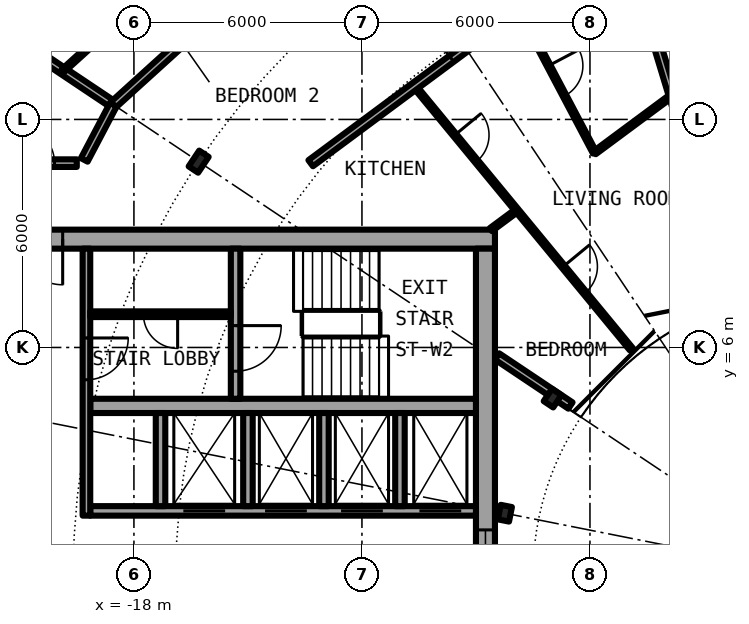
"""IFC4 building model, lengths in metres.
Left out: names, types, materials, properties, quantities, classifications, styles, units other than length and angle.
Written with IfcOpenShell. Run it as: python <this file> out.ifc"""

import sys

from ifc_helpers import new_model, si_unit, direction, frame, frame_2d, origin, origin_2d, place, context, subcontext, project, spatial, rectangle, i_section, extrude, element, fill, save


model = new_model("IFC4")
c1 = context("Model", 3, precision=1e-05, world=origin(), true_north=direction((0.0, 1.0)))
c2 = subcontext(c1, "Body", "Model", "MODEL_VIEW")
j1 = project(units=[si_unit("LENGTHUNIT", "METRE"), si_unit("PLANEANGLEUNIT", "RADIAN")], contexts=[c1])
p1 = place(None, origin())
s1 = spatial("IfcSite", under=j1, at=p1, CompositionType="ELEMENT")
p2 = place(p1, origin())
s2 = spatial("IfcBuilding", under=s1, at=p2, CompositionType="ELEMENT")
p3 = place(p2, frame((0.0, 0.0, 151.3)))
s3 = spatial("IfcBuildingStorey", under=s2, at=p3, CompositionType="ELEMENT", Elevation=151.3)
p4 = place(p3, frame((-16.297, 10.889, 0.0), z_axis=(0.0, 0.0, 1.0), x_axis=(-0.831469612303, 0.55557023302, 0.0)))
e1 = element("IfcColumn", 1, at=p4, inside=s3, PredefinedType="COLUMN", context=c2, shape_type="SweptSolid", body=[
    extrude(i_section(OverallWidth=0.3, OverallDepth=0.5, WebThickness=0.014, FlangeThickness=0.028, FilletRadius=0.027, at=origin_2d()), origin(), (0.0, 0.0, 1.0), 3.05),
])
for number, where, z_axis, x_axis in (
    (2, (-6.984, 4.667, 0.0), (0.0, 0.0, 1.0), (-0.831, 0.556, 0.0)),
    (3, (-8.239, 1.639, 0.0), (0.0, 0.0, 1.0), (-0.981, 0.195, 0.0)),
):
    element("IfcColumn", number, at=place(p3, frame(where, z_axis=z_axis, x_axis=x_axis)), inside=s3, PredefinedType="COLUMN", context=c2, shape_type="SweptSolid", body=[
        extrude(i_section(OverallWidth=0.3, OverallDepth=0.39, WebThickness=0.011, FlangeThickness=0.019, FilletRadius=0.027, at=origin_2d()), origin(), (0.0, 0.0, 1.0), 3.05),
    ])
p5 = place(p3, frame((-8.5, 8.85, 0.0), z_axis=(0.0, 0.0, 1.0), x_axis=(-1.0, 0.0, 0.0)))
e4 = element("IfcWall", 4, at=p5, inside=s3, PredefinedType="SHEAR", context=c2, shape_type="SweptSolid", body=[
    extrude(rectangle(XDim=13.6, YDim=0.5, at=frame_2d((6.8, 0.0))), origin(), (0.0, 0.0, 1.0), 3.05),
])
p6 = place(p5, frame((11.375, 0.0, 0.0)))
e5 = element("IfcOpeningElement", 5, at=p6, cuts=e4, PredefinedType="OPENING", context=c2, shape_type="SweptSolid", body=[
    extrude(rectangle(XDim=1.2, YDim=2.3, at=frame_2d((0.6, 1.15))), frame((0.0, 0.26, 0.0), z_axis=(0.0, -1.0, 0.0), x_axis=(1.0, 0.0, 0.0)), (0.0, 0.0, 1.0), 0.52),
])
p7 = place(p3, frame((-8.75, 8.6, 0.0), z_axis=(0.0, 0.0, 1.0), x_axis=(0.0, -1.0, 0.0)))
e6 = element("IfcWall", 6, at=p7, inside=s3, PredefinedType="SHEAR", context=c2, shape_type="SweptSolid", body=[
    extrude(rectangle(XDim=17.2, YDim=0.5, at=frame_2d((8.6, 0.0))), origin(), (0.0, 0.0, 1.0), 3.05),
])
p8 = place(p7, frame((7.4, 0.0, 0.1)))
e7 = element("IfcOpeningElement", 7, at=p8, cuts=e6, PredefinedType="OPENING", context=c2, shape_type="SweptSolid", body=[
    extrude(rectangle(XDim=2.4, YDim=2.2, at=frame_2d((1.2, 1.1))), frame((0.0, 0.26, 0.0), z_axis=(0.0, -1.0, 0.0), x_axis=(1.0, 0.0, 0.0)), (0.0, 0.0, 1.0), 0.52),
])
p9 = place(p3, frame((-9.0, 1.7, 0.0), z_axis=(0.0, 0.0, 1.0), x_axis=(-1.0, 0.0, 0.0)))
e8 = element("IfcWall", 8, at=p9, inside=s3, PredefinedType="SHEAR", context=c2, shape_type="SweptSolid", body=[
    extrude(rectangle(XDim=10.15, YDim=0.25, at=frame_2d((5.075, 0.0))), origin(), (0.0, 0.0, 1.0), 3.05),
])
p10 = place(p9, frame((0.387, 0.0, 0.0)))
e9 = element("IfcOpeningElement", 9, at=p10, cuts=e8, PredefinedType="OPENING", context=c2, shape_type="SweptSolid", body=[
    extrude(rectangle(XDim=1.1, YDim=2.3, at=frame_2d((0.55, 1.15))), frame((0.0, 0.135, 0.0), z_axis=(0.0, -1.0, 0.0), x_axis=(1.0, 0.0, 0.0)), (0.0, 0.0, 1.0), 0.27),
])
p11 = place(p9, frame((2.45, 0.0, 0.0)))
e10 = element("IfcOpeningElement", 10, at=p11, cuts=e8, PredefinedType="OPENING", context=c2, shape_type="SweptSolid", body=[
    extrude(rectangle(XDim=1.1, YDim=2.3, at=frame_2d((0.55, 1.15))), frame((0.0, 0.135, 0.0), z_axis=(0.0, -1.0, 0.0), x_axis=(1.0, 0.0, 0.0)), (0.0, 0.0, 1.0), 0.27),
])
p12 = place(p9, frame((4.45, 0.0, 0.0)))
e11 = element("IfcOpeningElement", 11, at=p12, cuts=e8, PredefinedType="OPENING", context=c2, shape_type="SweptSolid", body=[
    extrude(rectangle(XDim=1.1, YDim=2.3, at=frame_2d((0.55, 1.15))), frame((0.0, 0.135, 0.0), z_axis=(0.0, -1.0, 0.0), x_axis=(1.0, 0.0, 0.0)), (0.0, 0.0, 1.0), 0.27),
])
p13 = place(p9, frame((6.6, 0.0, 0.0)))
e12 = element("IfcOpeningElement", 12, at=p13, cuts=e8, PredefinedType="OPENING", context=c2, shape_type="SweptSolid", body=[
    extrude(rectangle(XDim=1.1, YDim=2.3, at=frame_2d((0.55, 1.15))), frame((0.0, 0.135, 0.0), z_axis=(0.0, -1.0, 0.0), x_axis=(1.0, 0.0, 0.0)), (0.0, 0.0, 1.0), 0.27),
])
p14 = place(p3, frame((-9.0, 4.462, 0.0), z_axis=(0.0, 0.0, 1.0), x_axis=(-1.0, 0.0, 0.0)))
e13 = element("IfcWall", 13, at=p14, inside=s3, PredefinedType="SHEAR", context=c2, shape_type="SweptSolid", body=[
    extrude(rectangle(XDim=10.15, YDim=0.375, at=frame_2d((5.075, 0.0))), origin(), (0.0, 0.0, 1.0), 3.05),
])
p15 = place(p3, frame((-15.325, 8.6, 0.0), z_axis=(0.0, 0.0, 1.0), x_axis=(0.0, -1.0, 0.0)))
e14 = element("IfcWall", 14, at=p15, inside=s3, PredefinedType="SHEAR", context=c2, shape_type="SweptSolid", body=[
    extrude(rectangle(XDim=3.95, YDim=0.25, at=frame_2d((1.975, 0.0))), origin(), (0.0, 0.0, 1.0), 3.05),
])
p16 = place(p15, frame((2.025, 0.0, 0.0)))
e15 = element("IfcOpeningElement", 15, at=p16, cuts=e14, PredefinedType="OPENING", context=c2, shape_type="SweptSolid", body=[
    extrude(rectangle(XDim=1.2, YDim=2.3, at=frame_2d((0.6, 1.15))), frame((0.0, 0.135, 0.0), z_axis=(0.0, -1.0, 0.0), x_axis=(1.0, 0.0, 0.0)), (0.0, 0.0, 1.0), 0.27),
])
for number, where, z_axis, x_axis in (
    (16, (-15.0, 1.825, 0.0), (0.0, 0.0, 1.0), (0.0, 1.0, 0.0)),
    (17, (-17.3, 1.825, 0.0), (0.0, 0.0, 1.0), (0.0, 1.0, 0.0)),
):
    element("IfcWall", number, at=place(p3, frame(where, z_axis=z_axis, x_axis=x_axis)), inside=s3, PredefinedType="SOLIDWALL", context=c2, shape_type="SweptSolid", body=[
        extrude(rectangle(XDim=2.45, YDim=0.25, at=frame_2d((1.225, 0.0))), origin(), (0.0, 0.0, 1.0), 2.7),
    ])
p17 = place(p3, frame((-19.25, 8.6, 0.0), z_axis=(0.0, 0.0, 1.0), x_axis=(0.0, -1.0, 0.0)))
e18 = element("IfcWall", 18, at=p17, inside=s3, PredefinedType="SOLIDWALL", context=c2, shape_type="SweptSolid", body=[
    extrude(rectangle(XDim=7.025, YDim=0.2, at=frame_2d((3.513, 0.0))), origin(), (0.0, 0.0, 1.0), 2.7),
])
p18 = place(p17, frame((2.35, 0.0, 0.0)))
e19 = element("IfcOpeningElement", 19, at=p18, cuts=e18, PredefinedType="OPENING", context=c2, shape_type="SweptSolid", body=[
    extrude(rectangle(XDim=1.1, YDim=2.3, at=frame_2d((0.55, 1.15))), frame((0.0, 0.11, 0.0), z_axis=(0.0, -1.0, 0.0), x_axis=(1.0, 0.0, 0.0)), (0.0, 0.0, 1.0), 0.22),
])
for number, where, z_axis, x_axis in (
    (20, (-11.0, 1.825, 0.0), (0.0, 0.0, 1.0), (0.0, 1.0, 0.0)),
    (21, (-13.0, 1.825, 0.0), (0.0, 0.0, 1.0), (0.0, 1.0, 0.0)),
):
    element("IfcWall", number, at=place(p3, frame(where, z_axis=z_axis, x_axis=x_axis)), inside=s3, PredefinedType="SOLIDWALL", context=c2, shape_type="SweptSolid", body=[
        extrude(rectangle(XDim=2.45, YDim=0.25, at=frame_2d((1.225, 0.0))), origin(), (0.0, 0.0, 1.0), 2.7),
    ])
p19 = place(p3, frame((-15.45, 6.875, 0.0), z_axis=(0.0, 0.0, 1.0), x_axis=(-1.0, 0.0, 0.0)))
e22 = element("IfcWall", 22, at=p19, inside=s3, PredefinedType="PARTITIONING", context=c2, shape_type="SweptSolid", body=[
    extrude(rectangle(XDim=3.7, YDim=0.15, at=frame_2d((1.85, 0.0))), origin(), (0.0, 0.0, 1.0), 2.7),
])
p20 = place(p19, frame((1.4, 0.0, 0.0)))
e23 = element("IfcOpeningElement", 23, at=p20, cuts=e22, PredefinedType="OPENING", context=c2, shape_type="SweptSolid", body=[
    extrude(rectangle(XDim=0.9, YDim=2.3, at=frame_2d((0.45, 1.15))), frame((0.0, 0.085, 0.0), z_axis=(0.0, -1.0, 0.0), x_axis=(1.0, 0.0, 0.0)), (0.0, 0.0, 1.0), 0.17),
])
p21 = place(p3, frame((-22.595, 15.098, 0.0), z_axis=(0.0, 0.0, 1.0), x_axis=(0.831387096605, -0.55569370664, 0.0)))
e24 = element("IfcWall", 24, at=p21, inside=s3, PredefinedType="PARTITIONING", context=c2, shape_type="SweptSolid", body=[
    extrude(rectangle(XDim=4.875, YDim=0.2, at=frame_2d((2.438, 0.0))), origin(), (0.0, 0.0, 1.0), 2.7),
])
p22 = place(p3, frame((-10.616, 12.875, 0.0), z_axis=(0.0, 0.0, 1.0), x_axis=(0.636045954217, -0.771651180342, 0.0)))
e25 = element("IfcWall", 25, at=p22, inside=s3, PredefinedType="PARTITIONING", context=c2, shape_type="SweptSolid", body=[
    extrude(rectangle(XDim=8.968, YDim=0.1, at=frame_2d((4.484, 0.0))), origin(), (0.0, 0.0, 1.0), 2.7),
])
p23 = place(p22, frame((1.667, 0.0, 0.0)))
e26 = element("IfcOpeningElement", 26, at=p23, cuts=e25, PredefinedType="OPENING", context=c2, shape_type="SweptSolid", body=[
    extrude(rectangle(XDim=0.9, YDim=2.3, at=frame_2d((0.45, 1.15))), frame((0.0, 0.06, 0.0), z_axis=(0.0, -1.0, 0.0), x_axis=(1.0, 0.0, 0.0)), (0.0, 0.0, 1.0), 0.12),
])
p24 = place(p22, frame((6.151, 0.0, 0.0)))
e27 = element("IfcOpeningElement", 27, at=p24, cuts=e25, PredefinedType="OPENING", context=c2, shape_type="SweptSolid", body=[
    extrude(rectangle(XDim=0.9, YDim=2.3, at=frame_2d((0.45, 1.15))), frame((0.0, 0.06, 0.0), z_axis=(0.0, -1.0, 0.0), x_axis=(1.0, 0.0, 0.0)), (0.0, 0.0, 1.0), 0.12),
])
p25 = place(p3, frame((-7.875, 14.908, 0.0), z_axis=(0.0, 0.0, 1.0), x_axis=(0.467030118529, -0.884241408432, 0.0)))
e28 = element("IfcWall", 28, at=p25, inside=s3, PredefinedType="PARTITIONING", context=c2, shape_type="SweptSolid", body=[
    extrude(rectangle(XDim=4.278, YDim=0.1, at=frame_2d((2.139, 0.0))), origin(), (0.0, 0.0, 1.0), 2.7),
])
p26 = place(p25, frame((1.689, 0.0, 0.0)))
e29 = element("IfcOpeningElement", 29, at=p26, cuts=e28, PredefinedType="OPENING", context=c2, shape_type="SweptSolid", body=[
    extrude(rectangle(XDim=0.9, YDim=2.3, at=frame_2d((0.45, 1.15))), frame((0.0, 0.06, 0.0), z_axis=(0.0, -1.0, 0.0), x_axis=(1.0, 0.0, 0.0)), (0.0, 0.0, 1.0), 0.12),
])
p27 = place(p3, frame((-5.134, 16.939, 0.0), z_axis=(0.0, 0.0, 1.0), x_axis=(0.290284403441, -0.956940418793, 0.0)))
e30 = element("IfcWall", 30, at=p27, inside=s3, PredefinedType="PARTITIONING", context=c2, shape_type="SweptSolid", body=[
    extrude(rectangle(XDim=9.98, YDim=0.2, at=frame_2d((4.99, 0.0))), origin(), (0.0, 0.0, 1.0), 2.7),
])
p28 = place(p3, frame((-6.513, 4.472, 0.0), z_axis=(0.0, 0.0, 1.0), x_axis=(-0.83133816625, 0.555766905579, 0.0)))
e31 = element("IfcWall", 31, at=p28, inside=s3, PredefinedType="PARTITIONING", context=c2, shape_type="SweptSolid", body=[
    extrude(rectangle(XDim=2.323, YDim=0.2, at=frame_2d((1.162, 0.0))), origin(), (0.0, 0.0, 1.0), 2.7),
])
p29 = place(p3, frame((-21.675, 10.85, 0.0), z_axis=(0.0, 0.0, 1.0), x_axis=(1.0, 0.0, 0.0)))
e32 = element("IfcWall", 32, at=p29, inside=s3, PredefinedType="PARTITIONING", context=c2, shape_type="SweptSolid", body=[
    extrude(rectangle(XDim=2.171, YDim=0.2, at=frame_2d((1.085, 0.0))), origin(), (0.0, 0.0, 1.0), 2.7),
])
p30 = place(p29, frame((0.585, 0.0, 0.0)))
e33 = element("IfcOpeningElement", 33, at=p30, cuts=e32, PredefinedType="OPENING", context=c2, shape_type="SweptSolid", body=[
    extrude(rectangle(XDim=1.0, YDim=2.3, at=frame_2d((0.5, 1.15))), frame((0.0, 0.11, 0.0), z_axis=(0.0, -1.0, 0.0), x_axis=(1.0, 0.0, 0.0)), (0.0, 0.0, 1.0), 0.22),
])
p31 = place(p3, frame((-8.607, 9.1, 0.0), z_axis=(0.0, 0.0, 1.0), x_axis=(0.803199066515, 0.595710718007, 0.0)))
e34 = element("IfcWall", 34, at=p31, inside=s3, PredefinedType="PARTITIONING", context=c2, shape_type="SweptSolid", body=[
    extrude(rectangle(XDim=0.858, YDim=0.1, at=frame_2d((0.429, 0.0))), origin(), (0.0, 0.0, 1.0), 2.7),
])
p32 = place(p3, frame((-5.877, 11.125, 0.0), z_axis=(0.0, 0.0, 1.0), x_axis=(0.803259509791, 0.595629213463, 0.0)))
e35 = element("IfcWall", 35, at=p32, inside=s3, PredefinedType="PARTITIONING", context=c2, shape_type="SweptSolid", body=[
    extrude(rectangle(XDim=2.543, YDim=0.1, at=frame_2d((1.272, 0.0))), origin(), (0.0, 0.0, 1.0), 2.7),
])
p33 = place(p3, frame((-13.349, 10.848, 0.0), z_axis=(0.0, 0.0, 1.0), x_axis=(0.803229232922, 0.595670042371, 0.0)))
e36 = element("IfcWall", 36, at=p33, inside=s3, PredefinedType="PARTITIONING", context=c2, shape_type="SweptSolid", body=[
    extrude(rectangle(XDim=10.224, YDim=0.2, at=frame_2d((5.112, 0.0))), origin(), (0.0, 0.0, 1.0), 2.7),
])
p34 = place(p33, frame((4.612, 0.0, 0.0)))
e37 = element("IfcOpeningElement", 37, at=p34, cuts=e36, PredefinedType="OPENING", context=c2, shape_type="SweptSolid", body=[
    extrude(rectangle(XDim=1.0, YDim=2.3, at=frame_2d((0.5, 1.15))), frame((0.0, 0.11, 0.0), z_axis=(0.0, -1.0, 0.0), x_axis=(1.0, 0.0, 0.0)), (0.0, 0.0, 1.0), 0.22),
])
p35 = place(p3, frame((-18.544, 12.385, 0.0), z_axis=(0.0, 0.0, 1.0), x_axis=(0.740849323054, 0.67167125927, 0.0)))
e38 = element("IfcWall", 38, at=p35, inside=s3, PredefinedType="PARTITIONING", context=c2, shape_type="SweptSolid", body=[
    extrude(rectangle(XDim=10.842, YDim=0.2, at=frame_2d((5.421, 0.0))), origin(), (0.0, 0.0, 1.0), 2.7),
])
p36 = place(p35, frame((3.839, 0.0, 0.0)))
e39 = element("IfcOpeningElement", 39, at=p36, cuts=e38, PredefinedType="OPENING", context=c2, shape_type="SweptSolid", body=[
    extrude(rectangle(XDim=1.0, YDim=2.3, at=frame_2d((0.5, 1.15))), frame((0.0, 0.11, 0.0), z_axis=(0.0, -1.0, 0.0), x_axis=(1.0, 0.0, 0.0)), (0.0, 0.0, 1.0), 0.22),
])
p37 = place(p3, frame((-19.307, 10.935, 0.0), z_axis=(0.0, 0.0, 1.0), x_axis=(0.465605550524, 0.884992356646, 0.0)))
e40 = element("IfcWall", 40, at=p37, inside=s3, PredefinedType="PARTITIONING", context=c2, shape_type="SweptSolid", body=[
    extrude(rectangle(XDim=1.643, YDim=0.2, at=frame_2d((0.821, 0.0))), origin(), (0.0, 0.0, 1.0), 2.7),
])
p38 = place(p3, frame((-19.872, 13.278, 0.0), z_axis=(0.0, 0.0, 1.0), x_axis=(0.740923753351, 0.671589153962, 0.0)))
e41 = element("IfcWall", 41, at=p38, inside=s3, PredefinedType="PARTITIONING", context=c2, shape_type="SweptSolid", body=[
    extrude(rectangle(XDim=6.969, YDim=0.1, at=frame_2d((3.484, 0.0))), origin(), (0.0, 0.0, 1.0), 2.7),
])
p39 = place(p38, frame((3.034, 0.0, 0.0)))
e42 = element("IfcOpeningElement", 42, at=p39, cuts=e41, PredefinedType="OPENING", context=c2, shape_type="SweptSolid", body=[
    extrude(rectangle(XDim=0.9, YDim=2.3, at=frame_2d((0.45, 1.15))), frame((0.0, 0.06, 0.0), z_axis=(0.0, -1.0, 0.0), x_axis=(1.0, 0.0, 0.0)), (0.0, 0.0, 1.0), 0.12),
])
p40 = place(p38, frame((0.711, 0.0, 0.0)))
e43 = element("IfcOpeningElement", 43, at=p40, cuts=e41, PredefinedType="OPENING", context=c2, shape_type="SweptSolid", body=[
    extrude(rectangle(XDim=0.9, YDim=2.3, at=frame_2d((0.45, 1.15))), frame((0.0, 0.06, 0.0), z_axis=(0.0, -1.0, 0.0), x_axis=(1.0, 0.0, 0.0)), (0.0, 0.0, 1.0), 0.12),
])
p41 = place(p10, origin())
e44 = element("IfcDoor", 44, at=p41, inside=s3, OperationType="DOUBLE_DOOR_SLIDING", PredefinedType="DOOR", context=c2, shape_type="SweptSolid", body=[
    extrude(rectangle(XDim=1.1, YDim=2.3, at=frame_2d((0.55, 1.15))), frame((0.0, 0.025, 0.0), z_axis=(0.0, -1.0, 0.0), x_axis=(1.0, 0.0, 0.0)), (0.0, 0.0, 1.0), 0.05),
])
fill(e9, e44)
p42 = place(p11, origin())
e45 = element("IfcDoor", 45, at=p42, inside=s3, OperationType="DOUBLE_DOOR_SLIDING", PredefinedType="DOOR", context=c2, shape_type="SweptSolid", body=[
    extrude(rectangle(XDim=1.1, YDim=2.3, at=frame_2d((0.55, 1.15))), frame((0.0, 0.025, 0.0), z_axis=(0.0, -1.0, 0.0), x_axis=(1.0, 0.0, 0.0)), (0.0, 0.0, 1.0), 0.05),
])
fill(e10, e45)
p43 = place(p12, origin())
e46 = element("IfcDoor", 46, at=p43, inside=s3, OperationType="DOUBLE_DOOR_SLIDING", PredefinedType="DOOR", context=c2, shape_type="SweptSolid", body=[
    extrude(rectangle(XDim=1.1, YDim=2.3, at=frame_2d((0.55, 1.15))), frame((0.0, 0.025, 0.0), z_axis=(0.0, -1.0, 0.0), x_axis=(1.0, 0.0, 0.0)), (0.0, 0.0, 1.0), 0.05),
])
fill(e11, e46)
p44 = place(p13, origin())
e47 = element("IfcDoor", 47, at=p44, inside=s3, OperationType="DOUBLE_DOOR_SLIDING", PredefinedType="DOOR", context=c2, shape_type="SweptSolid", body=[
    extrude(rectangle(XDim=1.1, YDim=2.3, at=frame_2d((0.55, 1.15))), frame((0.0, 0.025, 0.0), z_axis=(0.0, -1.0, 0.0), x_axis=(1.0, 0.0, 0.0)), (0.0, 0.0, 1.0), 0.05),
])
fill(e12, e47)
p45 = place(p20, origin())
e48 = element("IfcDoor", 48, at=p45, inside=s3, OperationType="SINGLE_SWING_LEFT", PredefinedType="DOOR", context=c2, shape_type="SweptSolid", body=[
    extrude(rectangle(XDim=0.9, YDim=2.3, at=frame_2d((0.45, 1.15))), frame((0.0, 0.025, 0.0), z_axis=(0.0, -1.0, 0.0), x_axis=(1.0, 0.0, 0.0)), (0.0, 0.0, 1.0), 0.05),
])
fill(e23, e48)
p46 = place(p16, origin())
e49 = element("IfcDoor", 49, at=p46, inside=s3, OperationType="SINGLE_SWING_LEFT", PredefinedType="DOOR", context=c2, shape_type="SweptSolid", body=[
    extrude(rectangle(XDim=1.2, YDim=2.3, at=frame_2d((0.6, 1.15))), frame((0.0, 0.025, 0.0), z_axis=(0.0, -1.0, 0.0), x_axis=(1.0, 0.0, 0.0)), (0.0, 0.0, 1.0), 0.05),
])
fill(e15, e49)
p47 = place(p18, origin())
e50 = element("IfcDoor", 50, at=p47, inside=s3, OperationType="SINGLE_SWING_RIGHT", PredefinedType="DOOR", context=c2, shape_type="SweptSolid", body=[
    extrude(rectangle(XDim=1.1, YDim=2.3, at=frame_2d((0.55, 1.15))), frame((0.0, 0.025, 0.0), z_axis=(0.0, -1.0, 0.0), x_axis=(1.0, 0.0, 0.0)), (0.0, 0.0, 1.0), 0.05),
])
fill(e19, e50)
p48 = place(p6, origin())
e51 = element("IfcDoor", 51, at=p48, inside=s3, OperationType="SINGLE_SWING_LEFT", PredefinedType="DOOR", context=c2, shape_type="SweptSolid", body=[
    extrude(rectangle(XDim=1.2, YDim=2.3, at=frame_2d((0.6, 1.15))), frame((0.0, 0.025, 0.0), z_axis=(0.0, -1.0, 0.0), x_axis=(1.0, 0.0, 0.0)), (0.0, 0.0, 1.0), 0.05),
])
fill(e5, e51)
p49 = place(p8, origin())
e52 = element("IfcWindow", 52, at=p49, inside=s3, PartitioningType="SINGLE_PANEL", PredefinedType="WINDOW", context=c2, shape_type="SweptSolid", body=[
    extrude(rectangle(XDim=2.4, YDim=2.2, at=frame_2d((1.2, 1.1))), frame((0.0, 0.03, 0.0), z_axis=(0.0, -1.0, 0.0), x_axis=(1.0, 0.0, 0.0)), (0.0, 0.0, 1.0), 0.06),
])
fill(e7, e52)
p50 = place(p40, origin())
e53 = element("IfcDoor", 53, at=p50, inside=s3, OperationType="SINGLE_SWING_LEFT", PredefinedType="DOOR", context=c2, shape_type="SweptSolid", body=[
    extrude(rectangle(XDim=0.9, YDim=2.3, at=frame_2d((0.45, 1.15))), frame((0.0, 0.025, 0.0), z_axis=(0.0, -1.0, 0.0), x_axis=(1.0, 0.0, 0.0)), (0.0, 0.0, 1.0), 0.05),
])
fill(e43, e53)
p51 = place(p34, origin())
e54 = element("IfcDoor", 54, at=p51, inside=s3, OperationType="SINGLE_SWING_LEFT", PredefinedType="DOOR", context=c2, shape_type="SweptSolid", body=[
    extrude(rectangle(XDim=1.0, YDim=2.3, at=frame_2d((0.5, 1.15))), frame((0.0, 0.025, 0.0), z_axis=(0.0, -1.0, 0.0), x_axis=(1.0, 0.0, 0.0)), (0.0, 0.0, 1.0), 0.05),
])
fill(e37, e54)
p52 = place(p26, origin())
e55 = element("IfcDoor", 55, at=p52, inside=s3, OperationType="SINGLE_SWING_RIGHT", PredefinedType="DOOR", context=c2, shape_type="SweptSolid", body=[
    extrude(rectangle(XDim=0.9, YDim=2.3, at=frame_2d((0.45, 1.15))), frame((0.0, 0.025, 0.0), z_axis=(0.0, -1.0, 0.0), x_axis=(1.0, 0.0, 0.0)), (0.0, 0.0, 1.0), 0.05),
])
fill(e29, e55)
p53 = place(p23, origin())
e56 = element("IfcDoor", 56, at=p53, inside=s3, OperationType="SINGLE_SWING_LEFT", PredefinedType="DOOR", context=c2, shape_type="SweptSolid", body=[
    extrude(rectangle(XDim=0.9, YDim=2.3, at=frame_2d((0.45, 1.15))), frame((0.0, 0.025, 0.0), z_axis=(0.0, -1.0, 0.0), x_axis=(1.0, 0.0, 0.0)), (0.0, 0.0, 1.0), 0.05),
])
fill(e26, e56)
p54 = place(p24, origin())
e57 = element("IfcDoor", 57, at=p54, inside=s3, OperationType="SINGLE_SWING_RIGHT", PredefinedType="DOOR", context=c2, shape_type="SweptSolid", body=[
    extrude(rectangle(XDim=0.9, YDim=2.3, at=frame_2d((0.45, 1.15))), frame((0.0, 0.025, 0.0), z_axis=(0.0, -1.0, 0.0), x_axis=(1.0, 0.0, 0.0)), (0.0, 0.0, 1.0), 0.05),
])
fill(e27, e57)
p55 = place(p30, origin())
e58 = element("IfcDoor", 58, at=p55, inside=s3, OperationType="SINGLE_SWING_LEFT", PredefinedType="DOOR", context=c2, shape_type="SweptSolid", body=[
    extrude(rectangle(XDim=1.0, YDim=2.3, at=frame_2d((0.5, 1.15))), frame((0.0, 0.025, 0.0), z_axis=(0.0, -1.0, 0.0), x_axis=(1.0, 0.0, 0.0)), (0.0, 0.0, 1.0), 0.05),
])
fill(e33, e58)
save(model, sys.argv[1])
